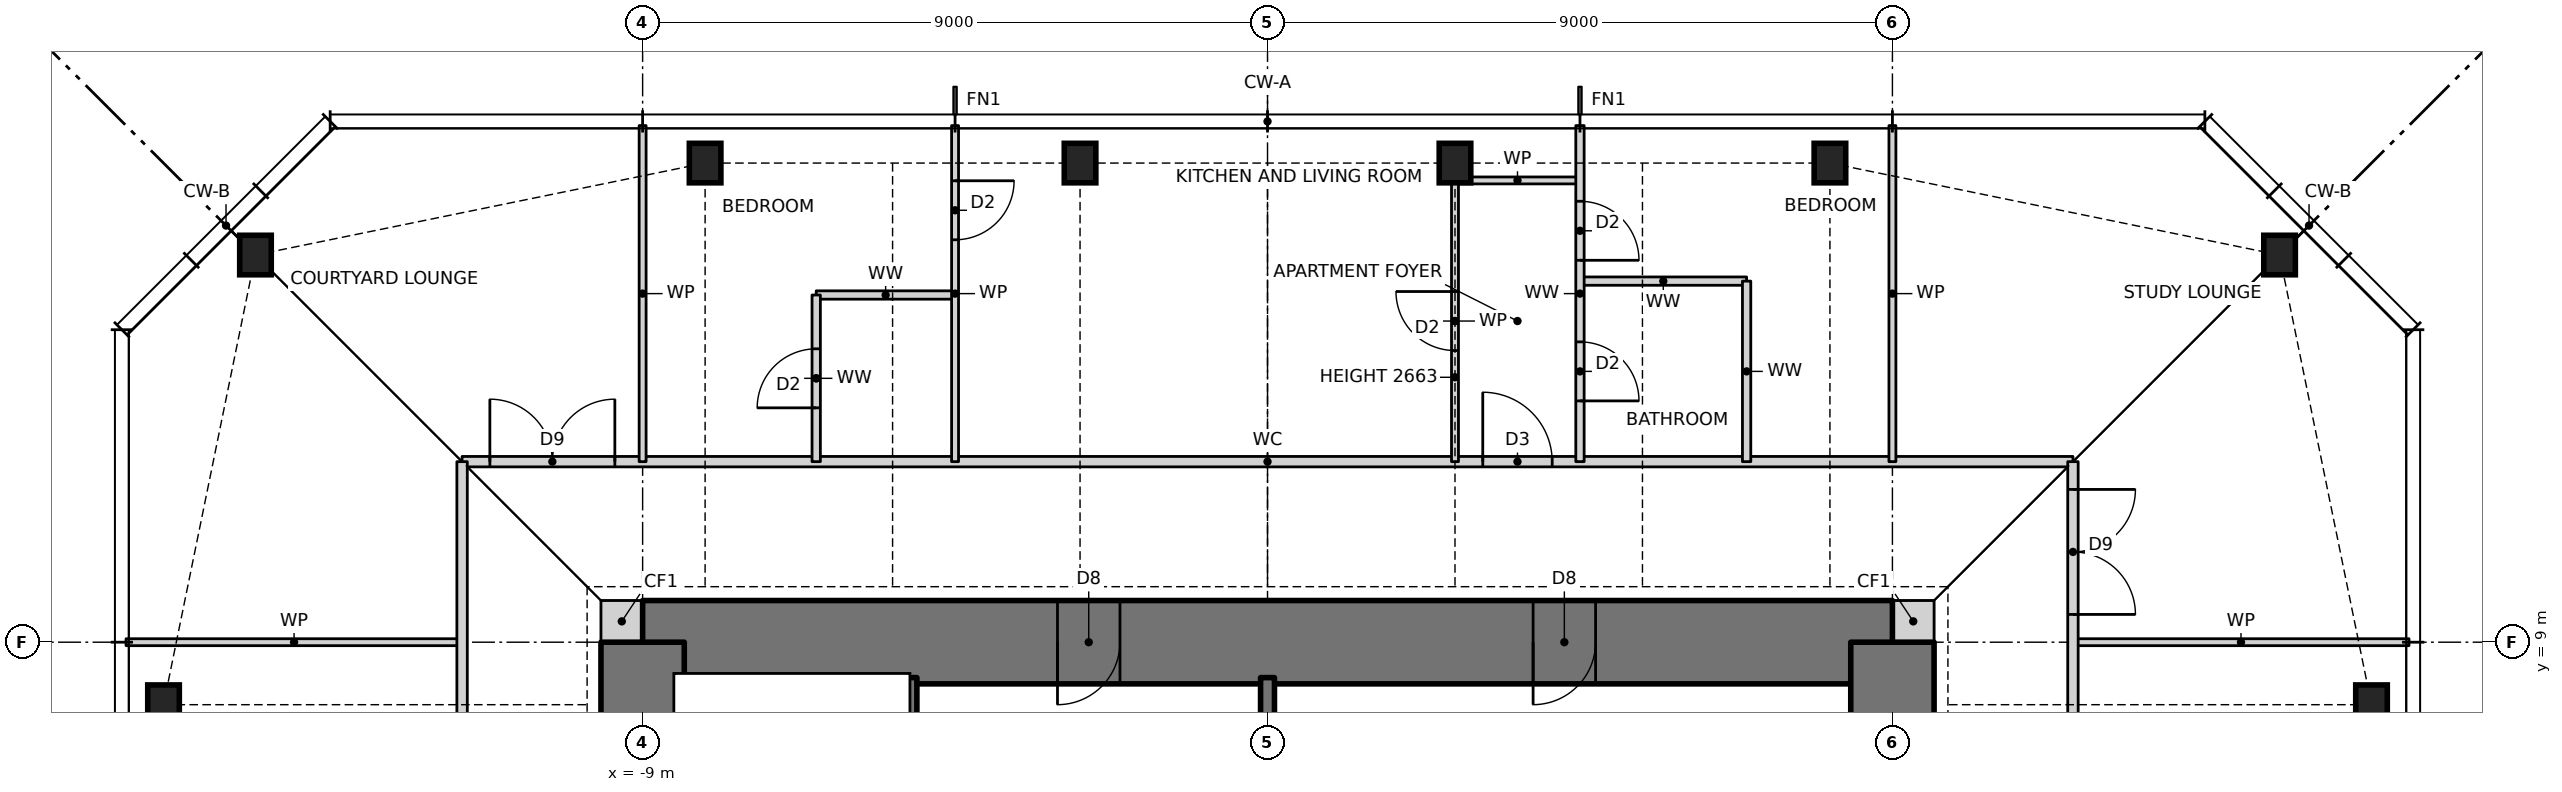
"""IFC4 building model, lengths in metres.
Left out: names, types, materials, properties, quantities, classifications, styles, units other than length and angle.
Written with IfcOpenShell. Run it as: python <this file> out.ifc"""

import sys

from ifc_helpers import new_model, si_unit, direction, frame, frame_2d, origin, origin_2d, place, context, subcontext, project, spatial, rectangle, i_section, extrude, element, fill, save


model = new_model("IFC4")
c1 = context("Model", 3, precision=1e-05, world=origin(), true_north=direction((0.0, 1.0)))
c2 = subcontext(c1, "Body", "Model", "MODEL_VIEW")
j1 = project(units=[si_unit("LENGTHUNIT", "METRE"), si_unit("PLANEANGLEUNIT", "RADIAN")], contexts=[c1])
p1 = place(None, origin())
s1 = spatial("IfcSite", under=j1, at=p1, CompositionType="ELEMENT")
p2 = place(p1, origin())
s2 = spatial("IfcBuilding", under=s1, at=p2, CompositionType="ELEMENT")
p3 = place(p2, frame((0.0, 0.0, 246.5)))
s3 = spatial("IfcBuildingStorey", under=s2, at=p3, CompositionType="ELEMENT", Elevation=246.5)
for number, where, z_axis, x_axis in (
    (1, (15.9, 8.1, 0.0), (0.0, 0.0, 1.0), (1.0, 0.0, 0.0)),
    (2, (14.576, 14.576, 0.0), (0.0, 0.0, 1.0), (1.0, 0.0, 0.0)),
    (3, (8.1, 15.9, 0.0), (0.0, 0.0, 1.0), (1.0, 0.0, 0.0)),
    (4, (2.7, 15.9, 0.0), (0.0, 0.0, 1.0), (1.0, 0.0, 0.0)),
    (5, (-2.7, 15.9, 0.0), (0.0, 0.0, 1.0), (1.0, 0.0, 0.0)),
    (6, (-8.1, 15.9, 0.0), (0.0, 0.0, 1.0), (1.0, 0.0, 0.0)),
    (7, (-14.576, 14.576, 0.0), (0.0, 0.0, 1.0), (1.0, 0.0, 0.0)),
    (8, (-15.9, 8.1, 0.0), (0.0, 0.0, 1.0), (1.0, 0.0, 0.0)),
):
    element("IfcColumn", number, at=place(p3, frame(where, z_axis=z_axis, x_axis=x_axis)), inside=s3, PredefinedType="COLUMN", context=c2, shape_type="SweptSolid", body=[
        extrude(i_section(OverallWidth=0.455, OverallDepth=0.569, WebThickness=0.078, FlangeThickness=0.125, at=origin_2d()), origin(), (0.0, 0.0, 1.0), 3.5),
    ])
for number, where, z_axis, x_axis in (
    (9, (9.0, 9.3, 0.0), (0.0, 0.0, 1.0), (1.0, 0.0, 0.0)),
    (10, (-9.6, 9.3, 0.0), (0.0, 0.0, 1.0), (1.0, 0.0, 0.0)),
):
    element("IfcWall", number, at=place(p3, frame(where, z_axis=z_axis, x_axis=x_axis)), inside=s3, PredefinedType="SOLIDWALL", context=c2, shape_type="SweptSolid", body=[
        extrude(rectangle(XDim=0.6, YDim=0.6, at=frame_2d((0.3, 0.0))), origin(), (0.0, 0.0, 1.0), 3.5),
    ])
p4 = place(p3, frame((9.0, 9.0, 0.0), z_axis=(0.0, 0.0, 1.0), x_axis=(-1.0, 0.0, 0.0)))
e11 = element("IfcWall", 11, at=p4, inside=s3, PredefinedType="SHEAR", context=c2, shape_type="SweptSolid", body=[
    extrude(rectangle(XDim=18.0, YDim=1.2, at=frame_2d((9.0, 0.0))), origin(), (0.0, 0.0, 1.0), 3.5),
])
p5 = place(p4, frame((11.125, 0.0, 0.0)))
e12 = element("IfcOpeningElement", 12, at=p5, cuts=e11, PredefinedType="OPENING", context=c2, shape_type="SweptSolid", body=[
    extrude(rectangle(XDim=0.9, YDim=2.1, at=frame_2d((0.45, 1.05))), frame((0.0, 0.61, 0.0), z_axis=(0.0, -1.0, 0.0), x_axis=(1.0, 0.0, 0.0)), (0.0, 0.0, 1.0), 1.22),
])
p6 = place(p4, frame((4.275, 0.0, 0.0)))
e13 = element("IfcOpeningElement", 13, at=p6, cuts=e11, PredefinedType="OPENING", context=c2, shape_type="SweptSolid", body=[
    extrude(rectangle(XDim=0.9, YDim=2.1, at=frame_2d((0.45, 1.05))), frame((0.0, 0.61, 0.0), z_axis=(0.0, -1.0, 0.0), x_axis=(1.0, 0.0, 0.0)), (0.0, 0.0, 1.0), 1.22),
])
p7 = place(p3, frame((9.0, -9.0, 0.0), z_axis=(0.0, 0.0, 1.0), x_axis=(0.0, 1.0, 0.0)))
e14 = element("IfcWall", 14, at=p7, inside=s3, PredefinedType="SHEAR", context=c2, shape_type="SweptSolid", body=[
    extrude(rectangle(XDim=18.0, YDim=1.2, at=frame_2d((9.0, 0.0))), origin(), (0.0, 0.0, 1.0), 3.5),
])
p8 = place(p7, frame((8.5, 0.0, 0.0)))
e15 = element("IfcOpeningElement", 15, at=p8, cuts=e14, PredefinedType="OPENING", context=c2, shape_type="SweptSolid", body=[
    extrude(rectangle(XDim=1.0, YDim=2.1, at=frame_2d((0.5, 1.05))), frame((0.0, 0.61, 0.0), z_axis=(0.0, -1.0, 0.0), x_axis=(1.0, 0.0, 0.0)), (0.0, 0.0, 1.0), 1.22),
])
p9 = place(p3, frame((-9.0, 9.0, 0.0), z_axis=(0.0, 0.0, 1.0), x_axis=(0.0, -1.0, 0.0)))
e16 = element("IfcWall", 16, at=p9, inside=s3, PredefinedType="SHEAR", context=c2, shape_type="SweptSolid", body=[
    extrude(rectangle(XDim=18.0, YDim=1.2, at=frame_2d((9.0, 0.0))), origin(), (0.0, 0.0, 1.0), 3.5),
])
p10 = place(p9, frame((8.5, 0.0, 0.0)))
e17 = element("IfcOpeningElement", 17, at=p10, cuts=e16, PredefinedType="OPENING", context=c2, shape_type="SweptSolid", body=[
    extrude(rectangle(XDim=1.0, YDim=2.1, at=frame_2d((0.5, 1.05))), frame((0.0, 0.61, 0.0), z_axis=(0.0, -1.0, 0.0), x_axis=(1.0, 0.0, 0.0)), (0.0, 0.0, 1.0), 1.22),
])
for number, where, z_axis, x_axis in (
    (18, (-16.44, 9.0, 0.0), (0.0, 0.0, 1.0), (1.0, 0.0, 0.0)),
    (19, (11.6, 9.0, 0.0), (0.0, 0.0, 1.0), (1.0, 0.0, 0.0)),
):
    element("IfcWall", number, at=place(p3, frame(where, z_axis=z_axis, x_axis=x_axis)), inside=s3, PredefinedType="PARTITIONING", context=c2, shape_type="SweptSolid", body=[
        extrude(rectangle(XDim=4.84, YDim=0.1, at=frame_2d((2.42, 0.0))), origin(), (0.0, 0.0, 1.0), 3.27),
    ])
p11 = place(p3, frame((-11.6, 11.6, 0.0), z_axis=(0.0, 0.0, 1.0), x_axis=(1.0, 0.0, 0.0)))
e20 = element("IfcWall", 20, at=p11, inside=s3, PredefinedType="PARTITIONING", context=c2, shape_type="SweptSolid", body=[
    extrude(rectangle(XDim=23.2, YDim=0.15, at=frame_2d((11.6, 0.0))), origin(), (0.0, 0.0, 1.0), 3.27),
])
p12 = place(p11, frame((14.7, 0.0, 0.0)))
e21 = element("IfcOpeningElement", 21, at=p12, cuts=e20, PredefinedType="OPENING", context=c2, shape_type="SweptSolid", body=[
    extrude(rectangle(XDim=1.0, YDim=2.1, at=frame_2d((0.5, 1.05))), frame((0.0, 0.085, 0.0), z_axis=(0.0, -1.0, 0.0), x_axis=(1.0, 0.0, 0.0)), (0.0, 0.0, 1.0), 0.17),
])
p13 = place(p11, frame((0.4, 0.0, 0.0)))
e22 = element("IfcOpeningElement", 22, at=p13, cuts=e20, PredefinedType="OPENING", context=c2, shape_type="SweptSolid", body=[
    extrude(rectangle(XDim=1.8, YDim=2.1, at=frame_2d((0.9, 1.05))), frame((0.0, 0.085, 0.0), z_axis=(0.0, -1.0, 0.0), x_axis=(1.0, 0.0, 0.0)), (0.0, 0.0, 1.0), 0.17),
])
p14 = place(p3, frame((-6.5, 14.0, 0.0), z_axis=(0.0, 0.0, 1.0), x_axis=(1.0, 0.0, 0.0)))
e23 = element("IfcWall", 23, at=p14, inside=s3, PredefinedType="PARTITIONING", context=c2, shape_type="SweptSolid", body=[
    extrude(rectangle(XDim=2.0, YDim=0.12, at=frame_2d((1.0, 0.0))), origin(), (0.0, 0.0, 1.0), 3.27),
])
p15 = place(p3, frame((4.5, 14.2, 0.0), z_axis=(0.0, 0.0, 1.0), x_axis=(1.0, 0.0, 0.0)))
e24 = element("IfcWall", 24, at=p15, inside=s3, PredefinedType="PARTITIONING", context=c2, shape_type="SweptSolid", body=[
    extrude(rectangle(XDim=2.4, YDim=0.12, at=frame_2d((1.2, 0.0))), origin(), (0.0, 0.0, 1.0), 3.27),
])
p16 = place(p3, frame((2.7, 15.65, 0.0), z_axis=(0.0, 0.0, 1.0), x_axis=(1.0, 0.0, 0.0)))
e25 = element("IfcWall", 25, at=p16, inside=s3, PredefinedType="PARTITIONING", context=c2, shape_type="SweptSolid", body=[
    extrude(rectangle(XDim=1.8, YDim=0.1, at=frame_2d((0.9, 0.0))), origin(), (0.0, 0.0, 1.0), 3.27),
])
p17 = place(p3, frame((11.6, -11.6, 0.0), z_axis=(0.0, 0.0, 1.0), x_axis=(0.0, 1.0, 0.0)))
e26 = element("IfcWall", 26, at=p17, inside=s3, PredefinedType="PARTITIONING", context=c2, shape_type="SweptSolid", body=[
    extrude(rectangle(XDim=23.2, YDim=0.15, at=frame_2d((11.6, 0.0))), origin(), (0.0, 0.0, 1.0), 3.27),
])
p18 = place(p17, frame((7.5, 0.0, 0.0)))
e27 = element("IfcOpeningElement", 27, at=p18, cuts=e26, PredefinedType="OPENING", context=c2, shape_type="SweptSolid", body=[
    extrude(rectangle(XDim=1.0, YDim=2.1, at=frame_2d((0.5, 1.05))), frame((0.0, 0.085, 0.0), z_axis=(0.0, -1.0, 0.0), x_axis=(1.0, 0.0, 0.0)), (0.0, 0.0, 1.0), 0.17),
])
p19 = place(p17, frame((21.0, 0.0, 0.0)))
e28 = element("IfcOpeningElement", 28, at=p19, cuts=e26, PredefinedType="OPENING", context=c2, shape_type="SweptSolid", body=[
    extrude(rectangle(XDim=1.8, YDim=2.1, at=frame_2d((0.9, 1.05))), frame((0.0, 0.085, 0.0), z_axis=(0.0, -1.0, 0.0), x_axis=(1.0, 0.0, 0.0)), (0.0, 0.0, 1.0), 0.17),
])
p20 = place(p3, frame((9.0, 11.6, 0.0), z_axis=(0.0, 0.0, 1.0), x_axis=(0.0, 1.0, 0.0)))
e29 = element("IfcWall", 29, at=p20, inside=s3, PredefinedType="PARTITIONING", context=c2, shape_type="SweptSolid", body=[
    extrude(rectangle(XDim=4.84, YDim=0.1, at=frame_2d((2.42, 0.0))), origin(), (0.0, 0.0, 1.0), 3.27),
])
p21 = place(p3, frame((6.9, 11.6, 0.0), z_axis=(0.0, 0.0, 1.0), x_axis=(0.0, 1.0, 0.0)))
e30 = element("IfcWall", 30, at=p21, inside=s3, PredefinedType="PARTITIONING", context=c2, shape_type="SweptSolid", body=[
    extrude(rectangle(XDim=2.6, YDim=0.12, at=frame_2d((1.3, 0.0))), origin(), (0.0, 0.0, 1.0), 3.27),
])
p22 = place(p3, frame((4.5, 11.6, 0.0), z_axis=(0.0, 0.0, 1.0), x_axis=(0.0, 1.0, 0.0)))
e31 = element("IfcWall", 31, at=p22, inside=s3, PredefinedType="PARTITIONING", context=c2, shape_type="SweptSolid", body=[
    extrude(rectangle(XDim=4.84, YDim=0.12, at=frame_2d((2.42, 0.0))), origin(), (0.0, 0.0, 1.0), 3.27),
])
p23 = place(p22, frame((2.9, 0.0, 0.0)))
e32 = element("IfcOpeningElement", 32, at=p23, cuts=e31, PredefinedType="OPENING", context=c2, shape_type="SweptSolid", body=[
    extrude(rectangle(XDim=0.85, YDim=2.1, at=frame_2d((0.425, 1.05))), frame((0.0, 0.07, 0.0), z_axis=(0.0, -1.0, 0.0), x_axis=(1.0, 0.0, 0.0)), (0.0, 0.0, 1.0), 0.14),
])
p24 = place(p22, frame((0.875, 0.0, 0.0)))
e33 = element("IfcOpeningElement", 33, at=p24, cuts=e31, PredefinedType="OPENING", context=c2, shape_type="SweptSolid", body=[
    extrude(rectangle(XDim=0.85, YDim=2.1, at=frame_2d((0.425, 1.05))), frame((0.0, 0.07, 0.0), z_axis=(0.0, -1.0, 0.0), x_axis=(1.0, 0.0, 0.0)), (0.0, 0.0, 1.0), 0.14),
])
p25 = place(p3, frame((2.7, 11.6, 0.0), z_axis=(0.0, 0.0, 1.0), x_axis=(0.0, 1.0, 0.0)))
e34 = element("IfcWall", 34, at=p25, inside=s3, PredefinedType="PARTITIONING", context=c2, shape_type="SweptSolid", body=[
    extrude(rectangle(XDim=4.05, YDim=0.1, at=frame_2d((2.025, 0.0))), origin(), (0.0, 0.0, 1.0), 2.663),
])
p26 = place(p25, frame((1.6, 0.0, 0.0)))
e35 = element("IfcOpeningElement", 35, at=p26, cuts=e34, PredefinedType="OPENING", context=c2, shape_type="SweptSolid", body=[
    extrude(rectangle(XDim=0.85, YDim=2.1, at=frame_2d((0.425, 1.05))), frame((0.0, 0.06, 0.0), z_axis=(0.0, -1.0, 0.0), x_axis=(1.0, 0.0, 0.0)), (0.0, 0.0, 1.0), 0.12),
])
p27 = place(p3, frame((0.0, 4.4, 0.0), z_axis=(0.0, 0.0, 1.0), x_axis=(0.0, 1.0, 0.0)))
e36 = element("IfcWall", 36, at=p27, inside=s3, PredefinedType="SOLIDWALL", context=c2, shape_type="SweptSolid", body=[
    extrude(rectangle(XDim=4.09, YDim=0.2, at=frame_2d((2.045, 0.0))), origin(), (0.0, 0.0, 1.0), 3.5),
])
p28 = place(p3, frame((-4.5, 11.6, 0.0), z_axis=(0.0, 0.0, 1.0), x_axis=(0.0, 1.0, 0.0)))
e37 = element("IfcWall", 37, at=p28, inside=s3, PredefinedType="PARTITIONING", context=c2, shape_type="SweptSolid", body=[
    extrude(rectangle(XDim=4.84, YDim=0.1, at=frame_2d((2.42, 0.0))), origin(), (0.0, 0.0, 1.0), 3.27),
])
p29 = place(p28, frame((3.195, 0.0, 0.0)))
e38 = element("IfcOpeningElement", 38, at=p29, cuts=e37, PredefinedType="OPENING", context=c2, shape_type="SweptSolid", body=[
    extrude(rectangle(XDim=0.85, YDim=2.1, at=frame_2d((0.425, 1.05))), frame((0.0, 0.06, 0.0), z_axis=(0.0, -1.0, 0.0), x_axis=(1.0, 0.0, 0.0)), (0.0, 0.0, 1.0), 0.12),
])
p30 = place(p3, frame((-5.15, 1.6, 0.0), z_axis=(0.0, 0.0, 1.0), x_axis=(0.0, 1.0, 0.0)))
e39 = element("IfcWall", 39, at=p30, inside=s3, PredefinedType="SOLIDWALL", context=c2, shape_type="SweptSolid", body=[
    extrude(rectangle(XDim=6.89, YDim=0.2, at=frame_2d((3.445, 0.0))), origin(), (0.0, 0.0, 1.0), 3.5),
])
p31 = place(p3, frame((-6.5, 11.6, 0.0), z_axis=(0.0, 0.0, 1.0), x_axis=(0.0, 1.0, 0.0)))
e40 = element("IfcWall", 40, at=p31, inside=s3, PredefinedType="PARTITIONING", context=c2, shape_type="SweptSolid", body=[
    extrude(rectangle(XDim=2.4, YDim=0.12, at=frame_2d((1.2, 0.0))), origin(), (0.0, 0.0, 1.0), 3.27),
])
p32 = place(p31, frame((0.775, 0.0, 0.0)))
e41 = element("IfcOpeningElement", 41, at=p32, cuts=e40, PredefinedType="OPENING", context=c2, shape_type="SweptSolid", body=[
    extrude(rectangle(XDim=0.85, YDim=2.1, at=frame_2d((0.425, 1.05))), frame((0.0, 0.07, 0.0), z_axis=(0.0, -1.0, 0.0), x_axis=(1.0, 0.0, 0.0)), (0.0, 0.0, 1.0), 0.14),
])
p33 = place(p3, frame((-9.0, 11.6, 0.0), z_axis=(0.0, 0.0, 1.0), x_axis=(0.0, 1.0, 0.0)))
e42 = element("IfcWall", 42, at=p33, inside=s3, PredefinedType="PARTITIONING", context=c2, shape_type="SweptSolid", body=[
    extrude(rectangle(XDim=4.84, YDim=0.1, at=frame_2d((2.42, 0.0))), origin(), (0.0, 0.0, 1.0), 3.27),
])
p34 = place(p3, frame((-11.6, -11.6, 0.0), z_axis=(0.0, 0.0, 1.0), x_axis=(0.0, 1.0, 0.0)))
e43 = element("IfcWall", 43, at=p34, inside=s3, PredefinedType="PARTITIONING", context=c2, shape_type="SweptSolid", body=[
    extrude(rectangle(XDim=23.2, YDim=0.15, at=frame_2d((11.6, 0.0))), origin(), (0.0, 0.0, 1.0), 3.27),
])
p35 = place(p34, frame((14.7, 0.0, 0.0)))
e44 = element("IfcOpeningElement", 44, at=p35, cuts=e43, PredefinedType="OPENING", context=c2, shape_type="SweptSolid", body=[
    extrude(rectangle(XDim=1.0, YDim=2.1, at=frame_2d((0.5, 1.05))), frame((0.0, 0.085, 0.0), z_axis=(0.0, -1.0, 0.0), x_axis=(1.0, 0.0, 0.0)), (0.0, 0.0, 1.0), 0.17),
])
p36 = place(p34, frame((0.875, 0.0, 0.0)))
e45 = element("IfcOpeningElement", 45, at=p36, cuts=e43, PredefinedType="OPENING", context=c2, shape_type="SweptSolid", body=[
    extrude(rectangle(XDim=0.85, YDim=2.1, at=frame_2d((0.425, 1.05))), frame((0.0, 0.085, 0.0), z_axis=(0.0, -1.0, 0.0), x_axis=(1.0, 0.0, 0.0)), (0.0, 0.0, 1.0), 0.17),
])
p37 = place(p12, origin())
e46 = element("IfcDoor", 46, at=p37, inside=s3, OperationType="SINGLE_SWING_LEFT", PredefinedType="DOOR", context=c2, shape_type="SweptSolid", body=[
    extrude(rectangle(XDim=1.0, YDim=2.1, at=frame_2d((0.5, 1.05))), frame((0.0, 0.025, 0.0), z_axis=(0.0, -1.0, 0.0), x_axis=(1.0, 0.0, 0.0)), (0.0, 0.0, 1.0), 0.05),
])
fill(e21, e46)
p38 = place(p26, origin())
e47 = element("IfcDoor", 47, at=p38, inside=s3, OperationType="SINGLE_SWING_RIGHT", PredefinedType="DOOR", context=c2, shape_type="SweptSolid", body=[
    extrude(rectangle(XDim=0.85, YDim=2.1, at=frame_2d((0.425, 1.05))), frame((0.0, 0.025, 0.0), z_axis=(0.0, -1.0, 0.0), x_axis=(1.0, 0.0, 0.0)), (0.0, 0.0, 1.0), 0.05),
])
fill(e35, e47)
p39 = place(p23, frame((0.85, 0.0, 0.0), z_axis=(0.0, 0.0, 1.0), x_axis=(-1.0, 0.0, 0.0)))
e48 = element("IfcDoor", 48, at=p39, inside=s3, OperationType="SINGLE_SWING_RIGHT", PredefinedType="DOOR", context=c2, shape_type="SweptSolid", body=[
    extrude(rectangle(XDim=0.85, YDim=2.1, at=frame_2d((0.425, 1.05))), frame((0.0, 0.025, 0.0), z_axis=(0.0, -1.0, 0.0), x_axis=(1.0, 0.0, 0.0)), (0.0, 0.0, 1.0), 0.05),
])
fill(e32, e48)
p40 = place(p24, frame((0.85, 0.0, 0.0), z_axis=(0.0, 0.0, 1.0), x_axis=(-1.0, 0.0, 0.0)))
e49 = element("IfcDoor", 49, at=p40, inside=s3, OperationType="SINGLE_SWING_RIGHT", PredefinedType="DOOR", context=c2, shape_type="SweptSolid", body=[
    extrude(rectangle(XDim=0.85, YDim=2.1, at=frame_2d((0.425, 1.05))), frame((0.0, 0.025, 0.0), z_axis=(0.0, -1.0, 0.0), x_axis=(1.0, 0.0, 0.0)), (0.0, 0.0, 1.0), 0.05),
])
fill(e33, e49)
p41 = place(p29, frame((0.85, 0.0, 0.0), z_axis=(0.0, 0.0, 1.0), x_axis=(-1.0, 0.0, 0.0)))
e50 = element("IfcDoor", 50, at=p41, inside=s3, OperationType="SINGLE_SWING_LEFT", PredefinedType="DOOR", context=c2, shape_type="SweptSolid", body=[
    extrude(rectangle(XDim=0.85, YDim=2.1, at=frame_2d((0.425, 1.05))), frame((0.0, 0.025, 0.0), z_axis=(0.0, -1.0, 0.0), x_axis=(1.0, 0.0, 0.0)), (0.0, 0.0, 1.0), 0.05),
])
fill(e38, e50)
p42 = place(p32, origin())
e51 = element("IfcDoor", 51, at=p42, inside=s3, OperationType="SINGLE_SWING_LEFT", PredefinedType="DOOR", context=c2, shape_type="SweptSolid", body=[
    extrude(rectangle(XDim=0.85, YDim=2.1, at=frame_2d((0.425, 1.05))), frame((0.0, 0.025, 0.0), z_axis=(0.0, -1.0, 0.0), x_axis=(1.0, 0.0, 0.0)), (0.0, 0.0, 1.0), 0.05),
])
fill(e41, e51)
p43 = place(p19, frame((1.8, 0.0, 0.0), z_axis=(0.0, 0.0, 1.0), x_axis=(-1.0, 0.0, 0.0)))
e52 = element("IfcDoor", 52, at=p43, inside=s3, OperationType="DOUBLE_DOOR_SINGLE_SWING", PredefinedType="DOOR", context=c2, shape_type="SweptSolid", body=[
    extrude(rectangle(XDim=1.8, YDim=2.1, at=frame_2d((0.9, 1.05))), frame((0.0, 0.025, 0.0), z_axis=(0.0, -1.0, 0.0), x_axis=(1.0, 0.0, 0.0)), (0.0, 0.0, 1.0), 0.05),
])
fill(e28, e52)
p44 = place(p13, origin())
e53 = element("IfcDoor", 53, at=p44, inside=s3, OperationType="DOUBLE_DOOR_SINGLE_SWING", PredefinedType="DOOR", context=c2, shape_type="SweptSolid", body=[
    extrude(rectangle(XDim=1.8, YDim=2.1, at=frame_2d((0.9, 1.05))), frame((0.0, 0.025, 0.0), z_axis=(0.0, -1.0, 0.0), x_axis=(1.0, 0.0, 0.0)), (0.0, 0.0, 1.0), 0.05),
])
fill(e22, e53)
p45 = place(p5, origin())
e54 = element("IfcDoor", 54, at=p45, inside=s3, OperationType="SINGLE_SWING_RIGHT", PredefinedType="DOOR", context=c2, shape_type="SweptSolid", body=[
    extrude(rectangle(XDim=0.9, YDim=2.1, at=frame_2d((0.45, 1.05))), frame((0.0, 0.025, 0.0), z_axis=(0.0, -1.0, 0.0), x_axis=(1.0, 0.0, 0.0)), (0.0, 0.0, 1.0), 0.05),
])
fill(e12, e54)
p46 = place(p6, origin())
e55 = element("IfcDoor", 55, at=p46, inside=s3, OperationType="SINGLE_SWING_RIGHT", PredefinedType="DOOR", context=c2, shape_type="SweptSolid", body=[
    extrude(rectangle(XDim=0.9, YDim=2.1, at=frame_2d((0.45, 1.05))), frame((0.0, 0.025, 0.0), z_axis=(0.0, -1.0, 0.0), x_axis=(1.0, 0.0, 0.0)), (0.0, 0.0, 1.0), 0.05),
])
fill(e13, e55)
save(model, sys.argv[1])
